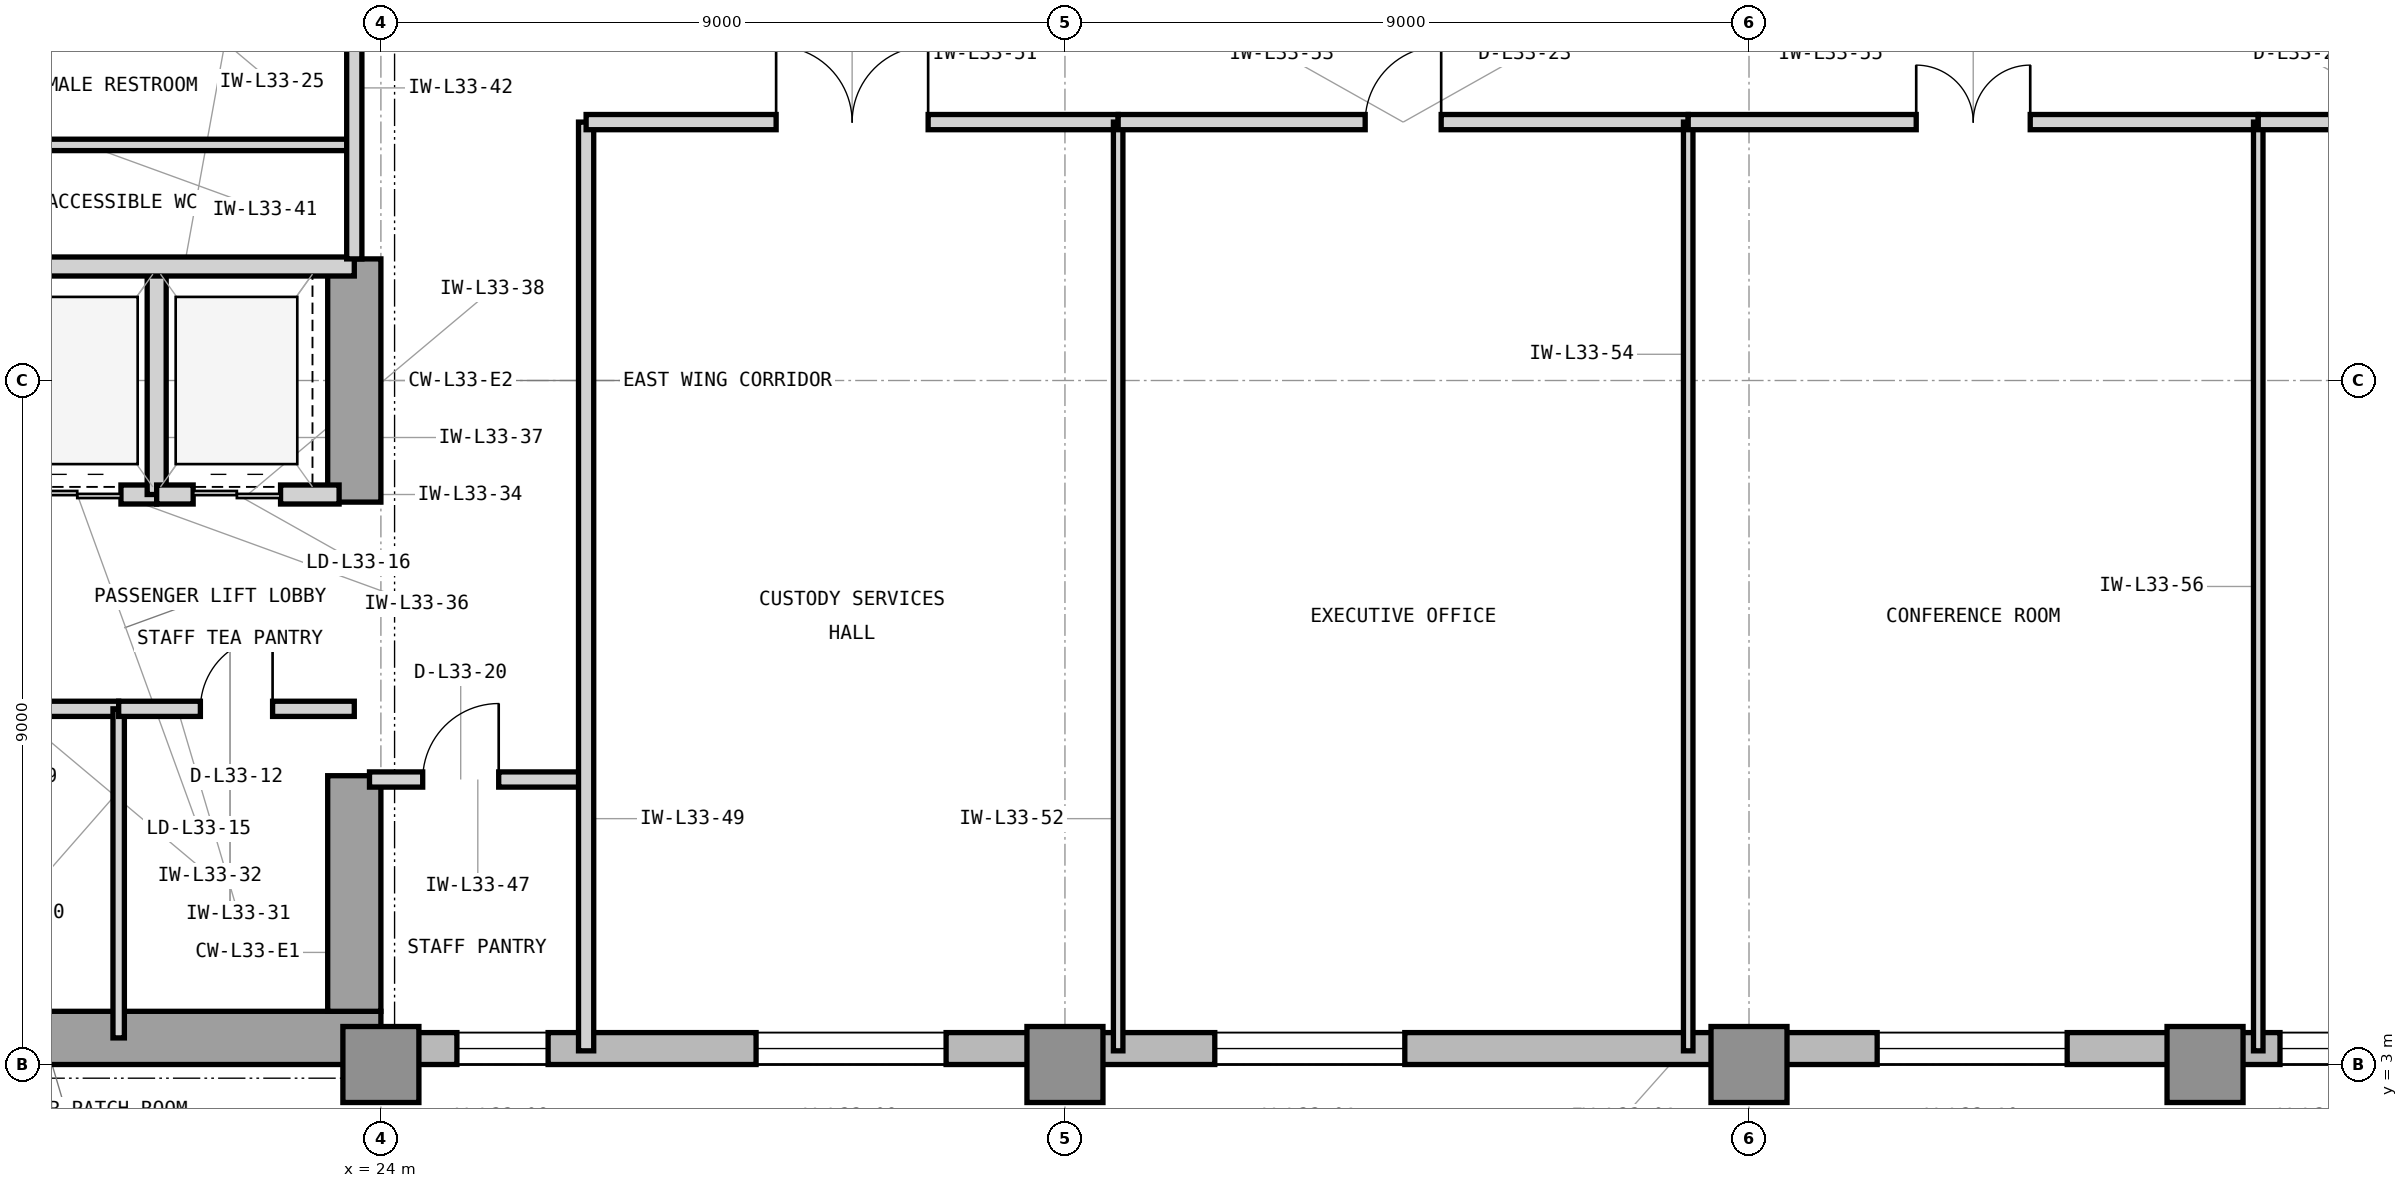
"""IFC4 building model, lengths in metres.
Left out: names, types, materials, properties, quantities, classifications, styles, units other than length and angle.
Written with IfcOpenShell. Run it as: python <this file> out.ifc"""

import sys

from ifc_helpers import new_model, si_unit, direction, frame, frame_2d, origin, origin_2d, place, context, subcontext, project, spatial, rectangle, extrude, element, fill, save


model = new_model("IFC4")
c1 = context("Model", 3, precision=1e-05, world=origin(), true_north=direction((0.0, 1.0)))
c2 = subcontext(c1, "Body", "Model", "MODEL_VIEW")
j1 = project(units=[si_unit("LENGTHUNIT", "METRE"), si_unit("PLANEANGLEUNIT", "RADIAN")], contexts=[c1])
p1 = place(None, origin())
s1 = spatial("IfcSite", under=j1, at=p1, CompositionType="ELEMENT")
p2 = place(p1, origin())
s2 = spatial("IfcBuilding", under=s1, at=p2, CompositionType="ELEMENT")
p3 = place(p2, frame((0.0, 0.0, 140.1)))
s3 = spatial("IfcBuildingStorey", under=s2, at=p3, CompositionType="ELEMENT", Elevation=140.1)
p4 = place(p3, frame((7.475, 3.35, 0.0), z_axis=(0.0, 0.0, 1.0), x_axis=(1.0, 0.0, 0.0)))
e1 = element("IfcWall", 1, at=p4, inside=s3, PredefinedType="SHEAR", context=c2, shape_type="SweptSolid", body=[
    extrude(rectangle(XDim=16.525, YDim=0.7, at=frame_2d((8.262, 0.0))), origin(), (0.0, 0.0, 1.0), 3.9),
])
p5 = place(p3, frame((23.65, 3.7, 0.0), z_axis=(0.0, 0.0, 1.0), x_axis=(0.0, 1.0, 0.0)))
e2 = element("IfcWall", 2, at=p5, inside=s3, PredefinedType="SHEAR", context=c2, shape_type="SweptSolid", body=[
    extrude(rectangle(XDim=3.1, YDim=0.7, at=frame_2d((1.55, 0.0))), origin(), (0.0, 0.0, 1.0), 3.9),
])
p6 = place(p3, frame((23.65, 10.4, 0.0), z_axis=(0.0, 0.0, 1.0), x_axis=(0.0, 1.0, 0.0)))
e3 = element("IfcWall", 3, at=p6, inside=s3, PredefinedType="SHEAR", context=c2, shape_type="SweptSolid", body=[
    extrude(rectangle(XDim=3.2, YDim=0.7, at=frame_2d((1.6, 0.0))), origin(), (0.0, 0.0, 1.0), 3.9),
])
for number, where, z_axis, x_axis in (
    (4, (24.0, 3.0, 0.0), (0.0, 0.0, 1.0), (1.0, 0.0, 0.0)),
    (5, (33.0, 3.0, 0.0), (0.0, 0.0, 1.0), (1.0, 0.0, 0.0)),
    (6, (42.0, 3.0, 0.0), (0.0, 0.0, 1.0), (1.0, 0.0, 0.0)),
    (7, (48.0, 3.0, 0.0), (0.0, 0.0, 1.0), (1.0, 0.0, 0.0)),
):
    element("IfcColumn", number, at=place(p3, frame(where, z_axis=z_axis, x_axis=x_axis)), inside=s3, PredefinedType="COLUMN", context=c2, shape_type="SweptSolid", body=[
        extrude(rectangle(XDim=1.0, YDim=1.0, at=origin_2d()), origin(), (0.0, 0.0, 1.0), 3.9),
    ])
p7 = place(p3, frame((23.9, 3.21, 0.0), z_axis=(0.0, 0.0, 1.0), x_axis=(1.0, 0.0, 0.0)))
e8 = element("IfcWall", 8, at=p7, inside=s3, PredefinedType="STANDARD", context=c2, shape_type="SweptSolid", body=[
    extrude(rectangle(XDim=34.5, YDim=0.42, at=frame_2d((17.25, 0.0))), origin(), (0.0, 0.0, 1.0), 3.7),
])
p8 = place(p7, frame((11.071, 0.0, 0.85)))
e9 = element("IfcOpeningElement", 9, at=p8, cuts=e8, PredefinedType="OPENING", context=c2, shape_type="SweptSolid", body=[
    extrude(rectangle(XDim=2.5, YDim=2.25, at=frame_2d((1.25, 1.125))), frame((0.0, 0.22, 0.0), z_axis=(0.0, -1.0, 0.0), x_axis=(1.0, 0.0, 0.0)), (0.0, 0.0, 1.0), 0.44),
])
p9 = place(p7, frame((1.1, 0.0, 0.85)))
e10 = element("IfcOpeningElement", 10, at=p9, cuts=e8, PredefinedType="OPENING", context=c2, shape_type="SweptSolid", body=[
    extrude(rectangle(XDim=1.2, YDim=2.25, at=frame_2d((0.6, 1.125))), frame((0.0, 0.22, 0.0), z_axis=(0.0, -1.0, 0.0), x_axis=(1.0, 0.0, 0.0)), (0.0, 0.0, 1.0), 0.44),
])
p10 = place(p7, frame((5.036, 0.0, 0.85)))
e11 = element("IfcOpeningElement", 11, at=p10, cuts=e8, PredefinedType="OPENING", context=c2, shape_type="SweptSolid", body=[
    extrude(rectangle(XDim=2.5, YDim=2.25, at=frame_2d((1.25, 1.125))), frame((0.0, 0.22, 0.0), z_axis=(0.0, -1.0, 0.0), x_axis=(1.0, 0.0, 0.0)), (0.0, 0.0, 1.0), 0.44),
])
p11 = place(p7, frame((19.786, 0.0, 0.85)))
e12 = element("IfcOpeningElement", 12, at=p11, cuts=e8, PredefinedType="OPENING", context=c2, shape_type="SweptSolid", body=[
    extrude(rectangle(XDim=2.5, YDim=2.25, at=frame_2d((1.25, 1.125))), frame((0.0, 0.22, 0.0), z_axis=(0.0, -1.0, 0.0), x_axis=(1.0, 0.0, 0.0)), (0.0, 0.0, 1.0), 0.44),
])
p12 = place(p7, frame((25.086, 0.0, 0.85)))
e13 = element("IfcOpeningElement", 13, at=p12, cuts=e8, PredefinedType="OPENING", context=c2, shape_type="SweptSolid", body=[
    extrude(rectangle(XDim=1.2, YDim=2.25, at=frame_2d((0.6, 1.125))), frame((0.0, 0.22, 0.0), z_axis=(0.0, -1.0, 0.0), x_axis=(1.0, 0.0, 0.0)), (0.0, 0.0, 1.0), 0.44),
])
p13 = place(p3, frame((17.55, 7.68, 0.0), z_axis=(0.0, 0.0, 1.0), x_axis=(1.0, 0.0, 0.0)))
e14 = element("IfcWall", 14, at=p13, inside=s3, PredefinedType="PARTITIONING", context=c2, shape_type="SweptSolid", body=[
    extrude(rectangle(XDim=3.0, YDim=0.2, at=frame_2d((1.5, 0.0))), origin(), (0.0, 0.0, 1.0), 3.69),
])
p14 = place(p13, frame((1.05, 0.0, 0.0)))
e15 = element("IfcOpeningElement", 15, at=p14, cuts=e14, PredefinedType="OPENING", context=c2, shape_type="SweptSolid", body=[
    extrude(rectangle(XDim=0.9, YDim=2.1, at=frame_2d((0.45, 1.05))), frame((0.0, 0.11, 0.0), z_axis=(0.0, -1.0, 0.0), x_axis=(1.0, 0.0, 0.0)), (0.0, 0.0, 1.0), 0.22),
])
p15 = place(p3, frame((20.55, 3.35, 0.0), z_axis=(0.0, 0.0, 1.0), x_axis=(0.0, 1.0, 0.0)))
e16 = element("IfcWall", 16, at=p15, inside=s3, PredefinedType="PARTITIONING", context=c2, shape_type="SweptSolid", body=[
    extrude(rectangle(XDim=4.33, YDim=0.15, at=frame_2d((2.165, 0.0))), origin(), (0.0, 0.0, 1.0), 3.69),
])
p16 = place(p3, frame((20.55, 7.68, 0.0), z_axis=(0.0, 0.0, 1.0), x_axis=(1.0, 0.0, 0.0)))
e17 = element("IfcWall", 17, at=p16, inside=s3, PredefinedType="PARTITIONING", context=c2, shape_type="SweptSolid", body=[
    extrude(rectangle(XDim=3.1, YDim=0.2, at=frame_2d((1.55, 0.0))), origin(), (0.0, 0.0, 1.0), 3.69),
])
p17 = place(p16, frame((1.075, 0.0, 0.0)))
e18 = element("IfcOpeningElement", 18, at=p17, cuts=e17, PredefinedType="OPENING", context=c2, shape_type="SweptSolid", body=[
    extrude(rectangle(XDim=0.95, YDim=2.1, at=frame_2d((0.475, 1.05))), frame((0.0, 0.11, 0.0), z_axis=(0.0, -1.0, 0.0), x_axis=(1.0, 0.0, 0.0)), (0.0, 0.0, 1.0), 0.22),
])
p18 = place(p3, frame((18.95, 10.5, 0.0), z_axis=(0.0, 0.0, 1.0), x_axis=(1.0, 0.0, 0.0)))
e19 = element("IfcWall", 19, at=p18, inside=s3, PredefinedType="PARTITIONING", context=c2, shape_type="SweptSolid", body=[
    extrude(rectangle(XDim=2.1, YDim=0.25, at=frame_2d((1.05, 0.0))), origin(), (0.0, 0.0, 1.0), 3.233),
])
p19 = place(p18, frame((0.48, 0.0, 0.0)))
e20 = element("IfcOpeningElement", 20, at=p19, cuts=e19, PredefinedType="OPENING", context=c2, shape_type="SweptSolid", body=[
    extrude(rectangle(XDim=1.15, YDim=2.25, at=frame_2d((0.575, 1.125))), frame((0.0, 0.135, 0.0), z_axis=(0.0, -1.0, 0.0), x_axis=(1.0, 0.0, 0.0)), (0.0, 0.0, 1.0), 0.27),
])
p20 = place(p3, frame((21.05, 10.5, 0.0), z_axis=(0.0, 0.0, 1.0), x_axis=(0.0, 1.0, 0.0)))
e21 = element("IfcWall", 21, at=p20, inside=s3, PredefinedType="PARTITIONING", context=c2, shape_type="SweptSolid", body=[
    extrude(rectangle(XDim=3.0, YDim=0.25, at=frame_2d((1.5, 0.0))), origin(), (0.0, 0.0, 1.0), 3.69),
])
p21 = place(p3, frame((21.05, 10.5, 0.0), z_axis=(0.0, 0.0, 1.0), x_axis=(1.0, 0.0, 0.0)))
e22 = element("IfcWall", 22, at=p21, inside=s3, PredefinedType="PARTITIONING", context=c2, shape_type="SweptSolid", body=[
    extrude(rectangle(XDim=2.4, YDim=0.25, at=frame_2d((1.2, 0.0))), origin(), (0.0, 0.0, 1.0), 3.233),
])
p22 = place(p21, frame((0.48, 0.0, 0.0)))
e23 = element("IfcOpeningElement", 23, at=p22, cuts=e22, PredefinedType="OPENING", context=c2, shape_type="SweptSolid", body=[
    extrude(rectangle(XDim=1.15, YDim=2.25, at=frame_2d((0.575, 1.125))), frame((0.0, 0.135, 0.0), z_axis=(0.0, -1.0, 0.0), x_axis=(1.0, 0.0, 0.0)), (0.0, 0.0, 1.0), 0.27),
])
p23 = place(p3, frame((14.7, 13.5, 0.0), z_axis=(0.0, 0.0, 1.0), x_axis=(1.0, 0.0, 0.0)))
e24 = element("IfcWall", 24, at=p23, inside=s3, PredefinedType="PARTITIONING", context=c2, shape_type="SweptSolid", body=[
    extrude(rectangle(XDim=8.95, YDim=0.25, at=frame_2d((4.475, 0.0))), origin(), (0.0, 0.0, 1.0), 3.233),
])
p24 = place(p3, frame((16.6, 15.1, 0.0), z_axis=(0.0, 0.0, 1.0), x_axis=(1.0, 0.0, 0.0)))
e25 = element("IfcWall", 25, at=p24, inside=s3, PredefinedType="PARTITIONING", context=c2, shape_type="SweptSolid", body=[
    extrude(rectangle(XDim=7.05, YDim=0.15, at=frame_2d((3.525, 0.0))), origin(), (0.0, 0.0, 1.0), 3.69),
])
p25 = place(p3, frame((23.65, 13.6, 0.0), z_axis=(0.0, 0.0, 1.0), x_axis=(0.0, 1.0, 0.0)))
e26 = element("IfcWall", 26, at=p25, inside=s3, PredefinedType="PARTITIONING", context=c2, shape_type="SweptSolid", body=[
    extrude(rectangle(XDim=3.0, YDim=0.2, at=frame_2d((1.5, 0.0))), origin(), (0.0, 0.0, 1.0), 3.69),
])
p26 = place(p3, frame((23.85, 6.75, 0.0), z_axis=(0.0, 0.0, 1.0), x_axis=(1.0, 0.0, 0.0)))
e27 = element("IfcWall", 27, at=p26, inside=s3, PredefinedType="PARTITIONING", context=c2, shape_type="SweptSolid", body=[
    extrude(rectangle(XDim=2.85, YDim=0.2, at=frame_2d((1.425, 0.0))), origin(), (0.0, 0.0, 1.0), 3.69),
])
p27 = place(p26, frame((0.7, 0.0, 0.0)))
e28 = element("IfcOpeningElement", 28, at=p27, cuts=e27, PredefinedType="OPENING", context=c2, shape_type="SweptSolid", body=[
    extrude(rectangle(XDim=1.0, YDim=2.15, at=frame_2d((0.5, 1.075))), frame((0.0, 0.11, 0.0), z_axis=(0.0, -1.0, 0.0), x_axis=(1.0, 0.0, 0.0)), (0.0, 0.0, 1.0), 0.22),
])
p28 = place(p3, frame((26.7, 3.18, 0.0), z_axis=(0.0, 0.0, 1.0), x_axis=(0.0, 1.0, 0.0)))
e29 = element("IfcWall", 29, at=p28, inside=s3, PredefinedType="PARTITIONING", context=c2, shape_type="SweptSolid", body=[
    extrude(rectangle(XDim=12.22, YDim=0.2, at=frame_2d((6.11, 0.0))), origin(), (0.0, 0.0, 1.0), 3.69),
])
p29 = place(p3, frame((26.7, 15.4, 0.0), z_axis=(0.0, 0.0, 1.0), x_axis=(1.0, 0.0, 0.0)))
e30 = element("IfcWall", 30, at=p29, inside=s3, PredefinedType="PARTITIONING", context=c2, shape_type="SweptSolid", body=[
    extrude(rectangle(XDim=7.0, YDim=0.2, at=frame_2d((3.5, 0.0))), origin(), (0.0, 0.0, 1.0), 3.69),
])
p30 = place(p29, frame((2.5, 0.0, 0.0)))
e31 = element("IfcOpeningElement", 31, at=p30, cuts=e30, PredefinedType="OPENING", context=c2, shape_type="SweptSolid", body=[
    extrude(rectangle(XDim=2.0, YDim=2.5, at=frame_2d((1.0, 1.25))), frame((0.0, 0.11, 0.0), z_axis=(0.0, -1.0, 0.0), x_axis=(1.0, 0.0, 0.0)), (0.0, 0.0, 1.0), 0.22),
])
p31 = place(p3, frame((33.7, 3.18, 0.0), z_axis=(0.0, 0.0, 1.0), x_axis=(0.0, 1.0, 0.0)))
e32 = element("IfcWall", 32, at=p31, inside=s3, PredefinedType="PARTITIONING", context=c2, shape_type="SweptSolid", body=[
    extrude(rectangle(XDim=12.22, YDim=0.125, at=frame_2d((6.11, 0.0))), origin(), (0.0, 0.0, 1.0), 3.69),
])
p32 = place(p3, frame((33.7, 15.4, 0.0), z_axis=(0.0, 0.0, 1.0), x_axis=(1.0, 0.0, 0.0)))
e33 = element("IfcWall", 33, at=p32, inside=s3, PredefinedType="PARTITIONING", context=c2, shape_type="SweptSolid", body=[
    extrude(rectangle(XDim=7.5, YDim=0.2, at=frame_2d((3.75, 0.0))), origin(), (0.0, 0.0, 1.0), 3.69),
])
p33 = place(p32, frame((3.25, 0.0, 0.0)))
e34 = element("IfcOpeningElement", 34, at=p33, cuts=e33, PredefinedType="OPENING", context=c2, shape_type="SweptSolid", body=[
    extrude(rectangle(XDim=1.0, YDim=2.15, at=frame_2d((0.5, 1.075))), frame((0.0, 0.11, 0.0), z_axis=(0.0, -1.0, 0.0), x_axis=(1.0, 0.0, 0.0)), (0.0, 0.0, 1.0), 0.22),
])
p34 = place(p3, frame((41.2, 3.18, 0.0), z_axis=(0.0, 0.0, 1.0), x_axis=(0.0, 1.0, 0.0)))
e35 = element("IfcWall", 35, at=p34, inside=s3, PredefinedType="PARTITIONING", context=c2, shape_type="SweptSolid", body=[
    extrude(rectangle(XDim=12.22, YDim=0.125, at=frame_2d((6.11, 0.0))), origin(), (0.0, 0.0, 1.0), 3.69),
])
p35 = place(p3, frame((41.2, 15.4, 0.0), z_axis=(0.0, 0.0, 1.0), x_axis=(1.0, 0.0, 0.0)))
e36 = element("IfcWall", 36, at=p35, inside=s3, PredefinedType="PARTITIONING", context=c2, shape_type="SweptSolid", body=[
    extrude(rectangle(XDim=7.5, YDim=0.2, at=frame_2d((3.75, 0.0))), origin(), (0.0, 0.0, 1.0), 3.69),
])
p36 = place(p35, frame((3.0, 0.0, 0.0)))
e37 = element("IfcOpeningElement", 37, at=p36, cuts=e36, PredefinedType="OPENING", context=c2, shape_type="SweptSolid", body=[
    extrude(rectangle(XDim=1.5, YDim=2.3, at=frame_2d((0.75, 1.15))), frame((0.0, 0.11, 0.0), z_axis=(0.0, -1.0, 0.0), x_axis=(1.0, 0.0, 0.0)), (0.0, 0.0, 1.0), 0.22),
])
p37 = place(p3, frame((48.7, 3.18, 0.0), z_axis=(0.0, 0.0, 1.0), x_axis=(0.0, 1.0, 0.0)))
e38 = element("IfcWall", 38, at=p37, inside=s3, PredefinedType="PARTITIONING", context=c2, shape_type="SweptSolid", body=[
    extrude(rectangle(XDim=12.22, YDim=0.125, at=frame_2d((6.11, 0.0))), origin(), (0.0, 0.0, 1.0), 3.69),
])
p38 = place(p3, frame((48.7, 15.4, 0.0), z_axis=(0.0, 0.0, 1.0), x_axis=(1.0, 0.0, 0.0)))
e39 = element("IfcWall", 39, at=p38, inside=s3, PredefinedType="PARTITIONING", context=c2, shape_type="SweptSolid", body=[
    extrude(rectangle(XDim=4.3, YDim=0.2, at=frame_2d((2.15, 0.0))), origin(), (0.0, 0.0, 1.0), 3.69),
])
p39 = place(p38, frame((1.65, 0.0, 0.0)))
e40 = element("IfcOpeningElement", 40, at=p39, cuts=e39, PredefinedType="OPENING", context=c2, shape_type="SweptSolid", body=[
    extrude(rectangle(XDim=1.0, YDim=2.15, at=frame_2d((0.5, 1.075))), frame((0.0, 0.11, 0.0), z_axis=(0.0, -1.0, 0.0), x_axis=(1.0, 0.0, 0.0)), (0.0, 0.0, 1.0), 0.22),
])
p40 = place(p8, origin())
e41 = element("IfcWindow", 41, at=p40, inside=s3, PartitioningType="SINGLE_PANEL", PredefinedType="WINDOW", context=c2, shape_type="SweptSolid", body=[
    extrude(rectangle(XDim=2.5, YDim=2.25, at=frame_2d((1.25, 1.125))), frame((0.0, 0.11, 0.0), z_axis=(0.0, -1.0, 0.0), x_axis=(1.0, 0.0, 0.0)), (0.0, 0.0, 1.0), 0.06),
])
fill(e9, e41)
p41 = place(p17, origin())
e42 = element("IfcDoor", 42, at=p41, inside=s3, OperationType="SINGLE_SWING_RIGHT", PredefinedType="DOOR", context=c2, shape_type="SweptSolid", body=[
    extrude(rectangle(XDim=0.95, YDim=2.1, at=frame_2d((0.475, 1.05))), frame((0.0, 0.025, 0.0), z_axis=(0.0, -1.0, 0.0), x_axis=(1.0, 0.0, 0.0)), (0.0, 0.0, 1.0), 0.05),
])
fill(e18, e42)
p42 = place(p19, origin())
e43 = element("IfcDoor", 43, at=p42, inside=s3, OperationType="DOUBLE_DOOR_SLIDING", PredefinedType="DOOR", context=c2, shape_type="SweptSolid", body=[
    extrude(rectangle(XDim=1.15, YDim=2.25, at=frame_2d((0.575, 1.125))), frame((0.0, 0.025, 0.0), z_axis=(0.0, -1.0, 0.0), x_axis=(1.0, 0.0, 0.0)), (0.0, 0.0, 1.0), 0.05),
])
fill(e20, e43)
p43 = place(p22, origin())
e44 = element("IfcDoor", 44, at=p43, inside=s3, OperationType="DOUBLE_DOOR_SLIDING", PredefinedType="DOOR", context=c2, shape_type="SweptSolid", body=[
    extrude(rectangle(XDim=1.15, YDim=2.25, at=frame_2d((0.575, 1.125))), frame((0.0, 0.025, 0.0), z_axis=(0.0, -1.0, 0.0), x_axis=(1.0, 0.0, 0.0)), (0.0, 0.0, 1.0), 0.05),
])
fill(e23, e44)
p44 = place(p27, origin())
e45 = element("IfcDoor", 45, at=p44, inside=s3, OperationType="SINGLE_SWING_RIGHT", PredefinedType="DOOR", context=c2, shape_type="SweptSolid", body=[
    extrude(rectangle(XDim=1.0, YDim=2.15, at=frame_2d((0.5, 1.075))), frame((0.0, 0.025, 0.0), z_axis=(0.0, -1.0, 0.0), x_axis=(1.0, 0.0, 0.0)), (0.0, 0.0, 1.0), 0.05),
])
fill(e28, e45)
p45 = place(p30, origin())
e46 = element("IfcDoor", 46, at=p45, inside=s3, OperationType="DOUBLE_DOOR_SINGLE_SWING", PredefinedType="DOOR", context=c2, shape_type="SweptSolid", body=[
    extrude(rectangle(XDim=2.0, YDim=2.5, at=frame_2d((1.0, 1.25))), frame((0.0, 0.025, 0.0), z_axis=(0.0, -1.0, 0.0), x_axis=(1.0, 0.0, 0.0)), (0.0, 0.0, 1.0), 0.05),
])
fill(e31, e46)
p46 = place(p33, origin())
e47 = element("IfcDoor", 47, at=p46, inside=s3, OperationType="SINGLE_SWING_RIGHT", PredefinedType="DOOR", context=c2, shape_type="SweptSolid", body=[
    extrude(rectangle(XDim=1.0, YDim=2.15, at=frame_2d((0.5, 1.075))), frame((0.0, 0.025, 0.0), z_axis=(0.0, -1.0, 0.0), x_axis=(1.0, 0.0, 0.0)), (0.0, 0.0, 1.0), 0.05),
])
fill(e34, e47)
p47 = place(p36, origin())
e48 = element("IfcDoor", 48, at=p47, inside=s3, OperationType="DOUBLE_DOOR_SINGLE_SWING", PredefinedType="DOOR", context=c2, shape_type="SweptSolid", body=[
    extrude(rectangle(XDim=1.5, YDim=2.3, at=frame_2d((0.75, 1.15))), frame((0.0, 0.025, 0.0), z_axis=(0.0, -1.0, 0.0), x_axis=(1.0, 0.0, 0.0)), (0.0, 0.0, 1.0), 0.05),
])
fill(e37, e48)
p48 = place(p9, origin())
e49 = element("IfcWindow", 49, at=p48, inside=s3, PartitioningType="SINGLE_PANEL", PredefinedType="WINDOW", context=c2, shape_type="SweptSolid", body=[
    extrude(rectangle(XDim=1.2, YDim=2.25, at=frame_2d((0.6, 1.125))), frame((0.0, 0.11, 0.0), z_axis=(0.0, -1.0, 0.0), x_axis=(1.0, 0.0, 0.0)), (0.0, 0.0, 1.0), 0.06),
])
fill(e10, e49)
p49 = place(p10, origin())
e50 = element("IfcWindow", 50, at=p49, inside=s3, PartitioningType="SINGLE_PANEL", PredefinedType="WINDOW", context=c2, shape_type="SweptSolid", body=[
    extrude(rectangle(XDim=2.5, YDim=2.25, at=frame_2d((1.25, 1.125))), frame((0.0, 0.11, 0.0), z_axis=(0.0, -1.0, 0.0), x_axis=(1.0, 0.0, 0.0)), (0.0, 0.0, 1.0), 0.06),
])
fill(e11, e50)
p50 = place(p11, origin())
e51 = element("IfcWindow", 51, at=p50, inside=s3, PartitioningType="SINGLE_PANEL", PredefinedType="WINDOW", context=c2, shape_type="SweptSolid", body=[
    extrude(rectangle(XDim=2.5, YDim=2.25, at=frame_2d((1.25, 1.125))), frame((0.0, 0.11, 0.0), z_axis=(0.0, -1.0, 0.0), x_axis=(1.0, 0.0, 0.0)), (0.0, 0.0, 1.0), 0.06),
])
fill(e12, e51)
p51 = place(p12, origin())
e52 = element("IfcWindow", 52, at=p51, inside=s3, PartitioningType="SINGLE_PANEL", PredefinedType="WINDOW", context=c2, shape_type="SweptSolid", body=[
    extrude(rectangle(XDim=1.2, YDim=2.25, at=frame_2d((0.6, 1.125))), frame((0.0, 0.11, 0.0), z_axis=(0.0, -1.0, 0.0), x_axis=(1.0, 0.0, 0.0)), (0.0, 0.0, 1.0), 0.06),
])
fill(e13, e52)
save(model, sys.argv[1])
